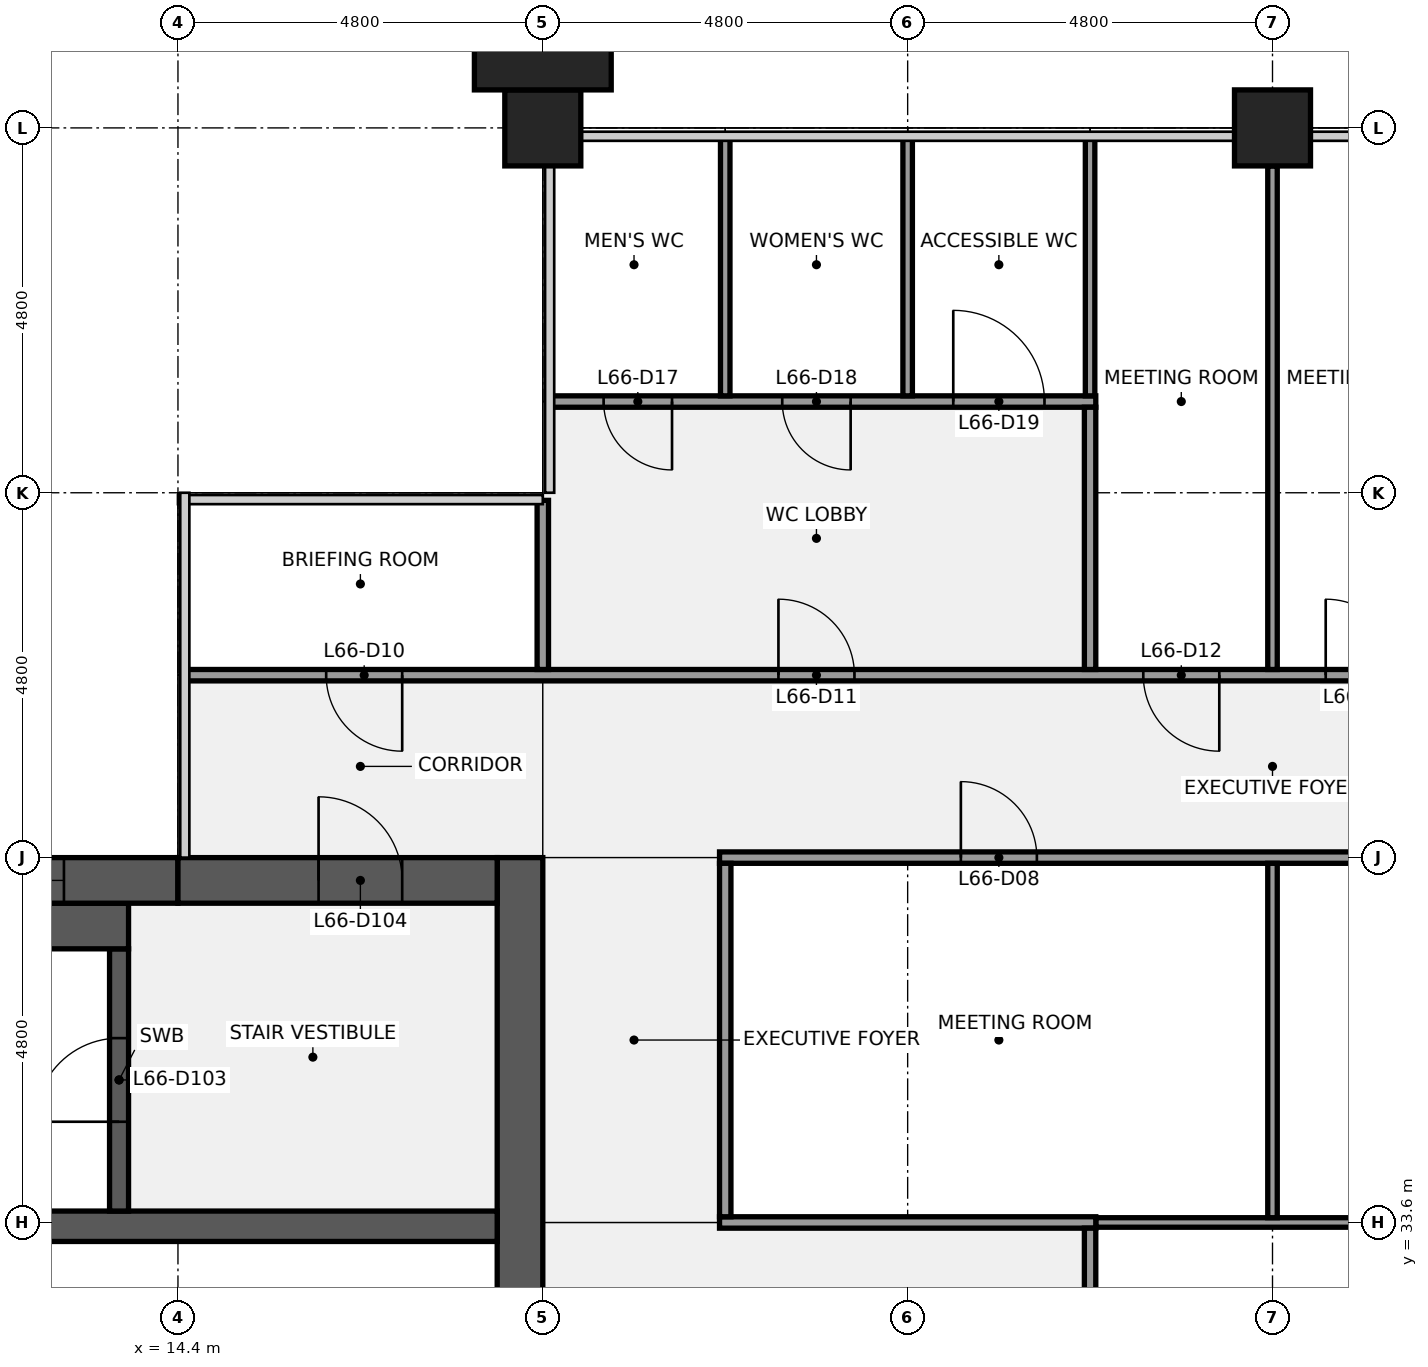
"""IFC4 building model, lengths in metres.
Left out: names, types, materials, properties, quantities, classifications, styles, units other than length and angle.
Written with IfcOpenShell. Run it as: python <this file> out.ifc"""

import sys

from ifc_helpers import new_model, si_unit, direction, frame, frame_2d, origin, origin_2d, place, context, subcontext, project, spatial, rectangle, extrude, element, fill, save


model = new_model("IFC4")
c1 = context("Model", 3, precision=1e-05, world=origin(), true_north=direction((0.0, 1.0)))
c2 = subcontext(c1, "Body", "Model", "MODEL_VIEW")
j1 = project(units=[si_unit("LENGTHUNIT", "METRE"), si_unit("PLANEANGLEUNIT", "RADIAN")], contexts=[c1])
p1 = place(None, origin())
s1 = spatial("IfcSite", under=j1, at=p1, CompositionType="ELEMENT")
p2 = place(p1, origin())
s2 = spatial("IfcBuilding", under=s1, at=p2, CompositionType="ELEMENT")
p3 = place(p2, frame((0.0, 0.0, 302.3)))
s3 = spatial("IfcBuildingStorey", under=s2, at=p3, CompositionType="ELEMENT", Elevation=302.3)
for number, where, z_axis, x_axis in (
    (1, (19.2, 48.0, 0.0), (0.0, 0.0, 1.0), (1.0, 0.0, 0.0)),
    (2, (28.8, 48.0, 0.0), (0.0, 0.0, 1.0), (1.0, 0.0, 0.0)),
):
    element("IfcColumn", number, at=place(p3, frame(where, z_axis=z_axis, x_axis=x_axis)), inside=s3, PredefinedType="COLUMN", context=c2, shape_type="SweptSolid", body=[
        extrude(rectangle(XDim=1.0, YDim=1.0, at=origin_2d()), origin(), (0.0, 0.0, 1.0), 4.0),
    ])
p4 = place(p3, frame((18.9, 38.4, 0.0), z_axis=(0.0, 0.0, 1.0), x_axis=(0.0, -1.0, 0.0)))
e3 = element("IfcWall", 3, at=p4, inside=s3, PredefinedType="SHEAR", context=c2, shape_type="SweptSolid", body=[
    extrude(rectangle(XDim=28.8, YDim=0.6, at=frame_2d((14.4, 0.0))), origin(), (0.0, 0.0, 1.0), 3.84),
])
p5 = place(p4, frame((18.3, 0.0, 0.0)))
e4 = element("IfcOpeningElement", 4, at=p5, cuts=e3, PredefinedType="OPENING", context=c2, shape_type="SweptSolid", body=[
    extrude(rectangle(XDim=1.8, YDim=2.1, at=frame_2d((0.9, 1.05))), frame((0.0, 0.31, 0.0), z_axis=(0.0, -1.0, 0.0), x_axis=(1.0, 0.0, 0.0)), (0.0, 0.0, 1.0), 0.62),
])
p6 = place(p4, frame((8.7, 0.0, 0.0)))
e5 = element("IfcOpeningElement", 5, at=p6, cuts=e3, PredefinedType="OPENING", context=c2, shape_type="SweptSolid", body=[
    extrude(rectangle(XDim=1.8, YDim=2.1, at=frame_2d((0.9, 1.05))), frame((0.0, 0.31, 0.0), z_axis=(0.0, -1.0, 0.0), x_axis=(1.0, 0.0, 0.0)), (0.0, 0.0, 1.0), 0.62),
])
p7 = place(p3, frame((0.6, 33.55, 0.0), z_axis=(0.0, 0.0, 1.0), x_axis=(1.0, 0.0, 0.0)))
e6 = element("IfcWall", 6, at=p7, inside=s3, PredefinedType="SHEAR", context=c2, shape_type="SweptSolid", body=[
    extrude(rectangle(XDim=18.0, YDim=0.4, at=frame_2d((9.0, 0.0))), origin(), (0.0, 0.0, 1.0), 3.84),
])
p8 = place(p3, frame((13.625, 33.75, 0.0), z_axis=(0.0, 0.0, 1.0), x_axis=(0.0, 1.0, 0.0)))
e7 = element("IfcWall", 7, at=p8, inside=s3, PredefinedType="SHEAR", context=c2, shape_type="SweptSolid", body=[
    extrude(rectangle(XDim=3.45, YDim=0.25, at=frame_2d((1.725, 0.0))), origin(), (0.0, 0.0, 1.0), 3.84),
])
p9 = place(p8, frame((1.175, 0.0, 0.0)))
e8 = element("IfcOpeningElement", 8, at=p9, cuts=e7, PredefinedType="OPENING", context=c2, shape_type="SweptSolid", body=[
    extrude(rectangle(XDim=1.1, YDim=2.1, at=frame_2d((0.55, 1.05))), frame((0.0, 0.135, 0.0), z_axis=(0.0, -1.0, 0.0), x_axis=(1.0, 0.0, 0.0)), (0.0, 0.0, 1.0), 0.27),
])
p10 = place(p3, frame((6.25, 37.5, 0.0), z_axis=(0.0, 0.0, 1.0), x_axis=(1.0, 0.0, 0.0)))
e9 = element("IfcWall", 9, at=p10, inside=s3, PredefinedType="SHEAR", context=c2, shape_type="SweptSolid", body=[
    extrude(rectangle(XDim=7.5, YDim=0.6, at=frame_2d((3.75, 0.0))), origin(), (0.0, 0.0, 1.0), 3.84),
])
p11 = place(p3, frame((0.6, 38.1, 0.0), z_axis=(0.0, 0.0, 1.0), x_axis=(1.0, 0.0, 0.0)))
e10 = element("IfcWall", 10, at=p11, inside=s3, PredefinedType="SHEAR", context=c2, shape_type="SweptSolid", body=[
    extrude(rectangle(XDim=13.8, YDim=0.6, at=frame_2d((6.9, 0.0))), origin(), (0.0, 0.0, 1.0), 3.84),
])
p12 = place(p11, frame((5.7, 0.0, 0.9)))
e11 = element("IfcOpeningElement", 11, at=p12, cuts=e10, PredefinedType="OPENING", context=c2, shape_type="SweptSolid", body=[
    extrude(rectangle(XDim=1.8, YDim=1.5, at=frame_2d((0.9, 0.75))), frame((0.0, 0.31, 0.0), z_axis=(0.0, -1.0, 0.0), x_axis=(1.0, 0.0, 0.0)), (0.0, 0.0, 1.0), 0.62),
])
p13 = place(p11, frame((10.5, 0.0, 0.9)))
e12 = element("IfcOpeningElement", 12, at=p13, cuts=e10, PredefinedType="OPENING", context=c2, shape_type="SweptSolid", body=[
    extrude(rectangle(XDim=1.8, YDim=1.5, at=frame_2d((0.9, 0.75))), frame((0.0, 0.31, 0.0), z_axis=(0.0, -1.0, 0.0), x_axis=(1.0, 0.0, 0.0)), (0.0, 0.0, 1.0), 0.62),
])
p14 = place(p3, frame((14.4, 38.1, 0.0), z_axis=(0.0, 0.0, 1.0), x_axis=(1.0, 0.0, 0.0)))
e13 = element("IfcWall", 13, at=p14, inside=s3, PredefinedType="SHEAR", context=c2, shape_type="SweptSolid", body=[
    extrude(rectangle(XDim=4.2, YDim=0.6, at=frame_2d((2.1, 0.0))), origin(), (0.0, 0.0, 1.0), 3.84),
])
p15 = place(p14, frame((1.85, 0.0, 0.0)))
e14 = element("IfcOpeningElement", 14, at=p15, cuts=e13, PredefinedType="OPENING", context=c2, shape_type="SweptSolid", body=[
    extrude(rectangle(XDim=1.1, YDim=2.1, at=frame_2d((0.55, 1.05))), frame((0.0, 0.31, 0.0), z_axis=(0.0, -1.0, 0.0), x_axis=(1.0, 0.0, 0.0)), (0.0, 0.0, 1.0), 0.62),
])
p16 = place(p3, frame((26.475, 33.6, 0.0), z_axis=(0.0, 0.0, 1.0), x_axis=(1.0, 0.0, 0.0)))
e15 = element("IfcWall", 15, at=p16, inside=s3, PredefinedType="PARTITIONING", context=c2, shape_type="SweptSolid", body=[
    extrude(rectangle(XDim=4.8, YDim=0.125, at=frame_2d((2.4, 0.0))), origin(), (0.0, 0.0, 1.0), 2.87),
])
p17 = place(p3, frame((21.525, 33.6, 0.0), z_axis=(0.0, 0.0, 1.0), x_axis=(1.0, 0.0, 0.0)))
e16 = element("IfcWall", 16, at=p17, inside=s3, PredefinedType="PARTITIONING", context=c2, shape_type="SweptSolid", body=[
    extrude(rectangle(XDim=4.95, YDim=0.15, at=frame_2d((2.475, 0.0))), origin(), (0.0, 0.0, 1.0), 2.87),
])
p18 = place(p3, frame((21.525, 38.4, 0.0), z_axis=(0.0, 0.0, 1.0), x_axis=(1.0, 0.0, 0.0)))
e17 = element("IfcWall", 17, at=p18, inside=s3, PredefinedType="PARTITIONING", context=c2, shape_type="SweptSolid", body=[
    extrude(rectangle(XDim=14.55, YDim=0.15, at=frame_2d((7.275, 0.0))), origin(), (0.0, 0.0, 1.0), 2.87),
])
p19 = place(p18, frame((3.175, 0.0, 0.0)))
e18 = element("IfcOpeningElement", 18, at=p19, cuts=e17, PredefinedType="OPENING", context=c2, shape_type="SweptSolid", body=[
    extrude(rectangle(XDim=1.0, YDim=2.1, at=frame_2d((0.5, 1.05))), frame((0.0, 0.085, 0.0), z_axis=(0.0, -1.0, 0.0), x_axis=(1.0, 0.0, 0.0)), (0.0, 0.0, 1.0), 0.17),
])
p20 = place(p18, frame((10.375, 0.0, 0.0)))
e19 = element("IfcOpeningElement", 19, at=p20, cuts=e17, PredefinedType="OPENING", context=c2, shape_type="SweptSolid", body=[
    extrude(rectangle(XDim=1.0, YDim=2.1, at=frame_2d((0.5, 1.05))), frame((0.0, 0.085, 0.0), z_axis=(0.0, -1.0, 0.0), x_axis=(1.0, 0.0, 0.0)), (0.0, 0.0, 1.0), 0.17),
])
p21 = place(p3, frame((14.5, 40.8, 0.0), z_axis=(0.0, 0.0, 1.0), x_axis=(1.0, 0.0, 0.0)))
e20 = element("IfcWall", 20, at=p21, inside=s3, PredefinedType="PARTITIONING", context=c2, shape_type="SweptSolid", body=[
    extrude(rectangle(XDim=28.6, YDim=0.15, at=frame_2d((14.3, 0.0))), origin(), (0.0, 0.0, 1.0), 2.87),
])
p22 = place(p21, frame((1.85, 0.0, 0.0)))
e21 = element("IfcOpeningElement", 21, at=p22, cuts=e20, PredefinedType="OPENING", context=c2, shape_type="SweptSolid", body=[
    extrude(rectangle(XDim=1.0, YDim=2.1, at=frame_2d((0.5, 1.05))), frame((0.0, 0.085, 0.0), z_axis=(0.0, -1.0, 0.0), x_axis=(1.0, 0.0, 0.0)), (0.0, 0.0, 1.0), 0.17),
])
p23 = place(p21, frame((7.8, 0.0, 0.0)))
e22 = element("IfcOpeningElement", 22, at=p23, cuts=e20, PredefinedType="OPENING", context=c2, shape_type="SweptSolid", body=[
    extrude(rectangle(XDim=1.0, YDim=2.1, at=frame_2d((0.5, 1.05))), frame((0.0, 0.085, 0.0), z_axis=(0.0, -1.0, 0.0), x_axis=(1.0, 0.0, 0.0)), (0.0, 0.0, 1.0), 0.17),
])
p24 = place(p21, frame((12.6, 0.0, 0.0)))
e23 = element("IfcOpeningElement", 23, at=p24, cuts=e20, PredefinedType="OPENING", context=c2, shape_type="SweptSolid", body=[
    extrude(rectangle(XDim=1.0, YDim=2.1, at=frame_2d((0.5, 1.05))), frame((0.0, 0.085, 0.0), z_axis=(0.0, -1.0, 0.0), x_axis=(1.0, 0.0, 0.0)), (0.0, 0.0, 1.0), 0.17),
])
p25 = place(p21, frame((15.0, 0.0, 0.0)))
e24 = element("IfcOpeningElement", 24, at=p25, cuts=e20, PredefinedType="OPENING", context=c2, shape_type="SweptSolid", body=[
    extrude(rectangle(XDim=1.0, YDim=2.1, at=frame_2d((0.5, 1.05))), frame((0.0, 0.085, 0.0), z_axis=(0.0, -1.0, 0.0), x_axis=(1.0, 0.0, 0.0)), (0.0, 0.0, 1.0), 0.17),
])
p26 = place(p21, frame((18.6, 0.0, 0.0)))
e25 = element("IfcOpeningElement", 25, at=p26, cuts=e20, PredefinedType="OPENING", context=c2, shape_type="SweptSolid", body=[
    extrude(rectangle(XDim=1.0, YDim=2.1, at=frame_2d((0.5, 1.05))), frame((0.0, 0.085, 0.0), z_axis=(0.0, -1.0, 0.0), x_axis=(1.0, 0.0, 0.0)), (0.0, 0.0, 1.0), 0.17),
])
p27 = place(p21, frame((22.2, 0.0, 0.0)))
e26 = element("IfcOpeningElement", 26, at=p27, cuts=e20, PredefinedType="OPENING", context=c2, shape_type="SweptSolid", body=[
    extrude(rectangle(XDim=1.0, YDim=2.1, at=frame_2d((0.5, 1.05))), frame((0.0, 0.085, 0.0), z_axis=(0.0, -1.0, 0.0), x_axis=(1.0, 0.0, 0.0)), (0.0, 0.0, 1.0), 0.17),
])
p28 = place(p21, frame((25.75, 0.0, 0.0)))
e27 = element("IfcOpeningElement", 27, at=p28, cuts=e20, PredefinedType="OPENING", context=c2, shape_type="SweptSolid", body=[
    extrude(rectangle(XDim=1.0, YDim=2.1, at=frame_2d((0.5, 1.05))), frame((0.0, 0.085, 0.0), z_axis=(0.0, -1.0, 0.0), x_axis=(1.0, 0.0, 0.0)), (0.0, 0.0, 1.0), 0.17),
])
p29 = place(p3, frame((19.3, 44.4, 0.0), z_axis=(0.0, 0.0, 1.0), x_axis=(1.0, 0.0, 0.0)))
e28 = element("IfcWall", 28, at=p29, inside=s3, PredefinedType="PARTITIONING", context=c2, shape_type="SweptSolid", body=[
    extrude(rectangle(XDim=7.175, YDim=0.15, at=frame_2d((3.587, 0.0))), origin(), (0.0, 0.0, 1.0), 2.87),
])
p30 = place(p29, frame((0.7, 0.0, 0.0)))
e29 = element("IfcOpeningElement", 29, at=p30, cuts=e28, PredefinedType="OPENING", context=c2, shape_type="SweptSolid", body=[
    extrude(rectangle(XDim=0.9, YDim=2.1, at=frame_2d((0.45, 1.05))), frame((0.0, 0.085, 0.0), z_axis=(0.0, -1.0, 0.0), x_axis=(1.0, 0.0, 0.0)), (0.0, 0.0, 1.0), 0.17),
])
p31 = place(p29, frame((3.05, 0.0, 0.0)))
e30 = element("IfcOpeningElement", 30, at=p31, cuts=e28, PredefinedType="OPENING", context=c2, shape_type="SweptSolid", body=[
    extrude(rectangle(XDim=0.9, YDim=2.1, at=frame_2d((0.45, 1.05))), frame((0.0, 0.085, 0.0), z_axis=(0.0, -1.0, 0.0), x_axis=(1.0, 0.0, 0.0)), (0.0, 0.0, 1.0), 0.17),
])
p32 = place(p29, frame((5.3, 0.0, 0.0)))
e31 = element("IfcOpeningElement", 31, at=p32, cuts=e28, PredefinedType="OPENING", context=c2, shape_type="SweptSolid", body=[
    extrude(rectangle(XDim=1.2, YDim=2.1, at=frame_2d((0.6, 1.05))), frame((0.0, 0.085, 0.0), z_axis=(0.0, -1.0, 0.0), x_axis=(1.0, 0.0, 0.0)), (0.0, 0.0, 1.0), 0.17),
])
p33 = place(p3, frame((19.2, 40.875, 0.0), z_axis=(0.0, 0.0, 1.0), x_axis=(0.0, 1.0, 0.0)))
e32 = element("IfcWall", 32, at=p33, inside=s3, PredefinedType="PARTITIONING", context=c2, shape_type="SweptSolid", body=[
    extrude(rectangle(XDim=2.225, YDim=0.15, at=frame_2d((1.113, 0.0))), origin(), (0.0, 0.0, 1.0), 2.87),
])
p34 = place(p3, frame((21.6, 44.475, 0.0), z_axis=(0.0, 0.0, 1.0), x_axis=(0.0, 1.0, 0.0)))
e33 = element("IfcWall", 33, at=p34, inside=s3, PredefinedType="PARTITIONING", context=c2, shape_type="SweptSolid", body=[
    extrude(rectangle(XDim=3.425, YDim=0.125, at=frame_2d((1.712, 0.0))), origin(), (0.0, 0.0, 1.0), 2.87),
])
p35 = place(p3, frame((21.6, 33.675, 0.0), z_axis=(0.0, 0.0, 1.0), x_axis=(0.0, 1.0, 0.0)))
e34 = element("IfcWall", 34, at=p35, inside=s3, PredefinedType="PARTITIONING", context=c2, shape_type="SweptSolid", body=[
    extrude(rectangle(XDim=4.65, YDim=0.15, at=frame_2d((2.325, 0.0))), origin(), (0.0, 0.0, 1.0), 2.87),
])
for number, where, z_axis, x_axis in (
    (35, (24.0, 44.475, 0.0), (0.0, 0.0, 1.0), (0.0, 1.0, 0.0)),
    (36, (26.4, 44.475, 0.0), (0.0, 0.0, 1.0), (0.0, 1.0, 0.0)),
):
    element("IfcWall", number, at=place(p3, frame(where, z_axis=z_axis, x_axis=x_axis)), inside=s3, PredefinedType="PARTITIONING", context=c2, shape_type="SweptSolid", body=[
        extrude(rectangle(XDim=3.425, YDim=0.125, at=frame_2d((1.712, 0.0))), origin(), (0.0, 0.0, 1.0), 2.87),
    ])
p36 = place(p3, frame((26.4, 26.475, 0.0), z_axis=(0.0, 0.0, 1.0), x_axis=(0.0, 1.0, 0.0)))
e37 = element("IfcWall", 37, at=p36, inside=s3, PredefinedType="PARTITIONING", context=c2, shape_type="SweptSolid", body=[
    extrude(rectangle(XDim=7.05, YDim=0.15, at=frame_2d((3.525, 0.0))), origin(), (0.0, 0.0, 1.0), 2.87),
])
p37 = place(p36, frame((3.025, 0.0, 0.0)))
e38 = element("IfcOpeningElement", 38, at=p37, cuts=e37, PredefinedType="OPENING", context=c2, shape_type="SweptSolid", body=[
    extrude(rectangle(XDim=1.0, YDim=2.1, at=frame_2d((0.5, 1.05))), frame((0.0, 0.085, 0.0), z_axis=(0.0, -1.0, 0.0), x_axis=(1.0, 0.0, 0.0)), (0.0, 0.0, 1.0), 0.17),
])
p38 = place(p3, frame((26.4, 40.875, 0.0), z_axis=(0.0, 0.0, 1.0), x_axis=(0.0, 1.0, 0.0)))
e39 = element("IfcWall", 39, at=p38, inside=s3, PredefinedType="PARTITIONING", context=c2, shape_type="SweptSolid", body=[
    extrude(rectangle(XDim=3.45, YDim=0.15, at=frame_2d((1.725, 0.0))), origin(), (0.0, 0.0, 1.0), 2.87),
])
p39 = place(p3, frame((28.8, 33.663, 0.0), z_axis=(0.0, 0.0, 1.0), x_axis=(0.0, 1.0, 0.0)))
e40 = element("IfcWall", 40, at=p39, inside=s3, PredefinedType="PARTITIONING", context=c2, shape_type="SweptSolid", body=[
    extrude(rectangle(XDim=4.662, YDim=0.125, at=frame_2d((2.331, 0.0))), origin(), (0.0, 0.0, 1.0), 2.87),
])
p40 = place(p3, frame((28.8, 40.875, 0.0), z_axis=(0.0, 0.0, 1.0), x_axis=(0.0, 1.0, 0.0)))
e41 = element("IfcWall", 41, at=p40, inside=s3, PredefinedType="PARTITIONING", context=c2, shape_type="SweptSolid", body=[
    extrude(rectangle(XDim=6.625, YDim=0.125, at=frame_2d((3.312, 0.0))), origin(), (0.0, 0.0, 1.0), 2.87),
])
p41 = place(p3, frame((19.2, 49.0, 0.0), z_axis=(0.0, 0.0, 1.0), x_axis=(1.0, 0.0, 0.0)))
e42 = element("IfcColumn", 42, at=p41, inside=s3, PredefinedType="PILASTER", context=c2, shape_type="SweptSolid", body=[
    extrude(rectangle(XDim=1.8, YDim=1.0, at=origin_2d()), origin(), (0.0, 0.0, 1.0), 4.0),
])
p42 = place(p9, origin())
e43 = element("IfcDoor", 43, at=p42, inside=s3, OperationType="SINGLE_SWING_LEFT", PredefinedType="DOOR", context=c2, shape_type="SweptSolid", body=[
    extrude(rectangle(XDim=1.1, YDim=2.1, at=frame_2d((0.55, 1.05))), frame((0.0, 0.025, 0.0), z_axis=(0.0, -1.0, 0.0), x_axis=(1.0, 0.0, 0.0)), (0.0, 0.0, 1.0), 0.05),
])
fill(e8, e43)
p43 = place(p15, origin())
e44 = element("IfcDoor", 44, at=p43, inside=s3, OperationType="SINGLE_SWING_LEFT", PredefinedType="DOOR", context=c2, shape_type="SweptSolid", body=[
    extrude(rectangle(XDim=1.1, YDim=2.1, at=frame_2d((0.55, 1.05))), frame((0.0, 0.025, 0.0), z_axis=(0.0, -1.0, 0.0), x_axis=(1.0, 0.0, 0.0)), (0.0, 0.0, 1.0), 0.05),
])
fill(e14, e44)
p44 = place(p13, origin())
e45 = element("IfcWindow", 45, at=p44, inside=s3, PartitioningType="SINGLE_PANEL", PredefinedType="WINDOW", context=c2, shape_type="SweptSolid", body=[
    extrude(rectangle(XDim=1.8, YDim=1.5, at=frame_2d((0.9, 0.75))), frame((0.0, 0.03, 0.0), z_axis=(0.0, -1.0, 0.0), x_axis=(1.0, 0.0, 0.0)), (0.0, 0.0, 1.0), 0.06),
])
fill(e12, e45)
p45 = place(p19, origin())
e46 = element("IfcDoor", 46, at=p45, inside=s3, OperationType="SINGLE_SWING_LEFT", PredefinedType="DOOR", context=c2, shape_type="SweptSolid", body=[
    extrude(rectangle(XDim=1.0, YDim=2.1, at=frame_2d((0.5, 1.05))), frame((0.0, 0.025, 0.0), z_axis=(0.0, -1.0, 0.0), x_axis=(1.0, 0.0, 0.0)), (0.0, 0.0, 1.0), 0.05),
])
fill(e18, e46)
p46 = place(p22, origin())
e47 = element("IfcDoor", 47, at=p46, inside=s3, OperationType="SINGLE_SWING_RIGHT", PredefinedType="DOOR", context=c2, shape_type="SweptSolid", body=[
    extrude(rectangle(XDim=1.0, YDim=2.1, at=frame_2d((0.5, 1.05))), frame((0.0, 0.025, 0.0), z_axis=(0.0, -1.0, 0.0), x_axis=(1.0, 0.0, 0.0)), (0.0, 0.0, 1.0), 0.05),
])
fill(e21, e47)
p47 = place(p23, origin())
e48 = element("IfcDoor", 48, at=p47, inside=s3, OperationType="SINGLE_SWING_LEFT", PredefinedType="DOOR", context=c2, shape_type="SweptSolid", body=[
    extrude(rectangle(XDim=1.0, YDim=2.1, at=frame_2d((0.5, 1.05))), frame((0.0, 0.025, 0.0), z_axis=(0.0, -1.0, 0.0), x_axis=(1.0, 0.0, 0.0)), (0.0, 0.0, 1.0), 0.05),
])
fill(e22, e48)
p48 = place(p24, origin())
e49 = element("IfcDoor", 49, at=p48, inside=s3, OperationType="SINGLE_SWING_RIGHT", PredefinedType="DOOR", context=c2, shape_type="SweptSolid", body=[
    extrude(rectangle(XDim=1.0, YDim=2.1, at=frame_2d((0.5, 1.05))), frame((0.0, 0.025, 0.0), z_axis=(0.0, -1.0, 0.0), x_axis=(1.0, 0.0, 0.0)), (0.0, 0.0, 1.0), 0.05),
])
fill(e23, e49)
p49 = place(p25, origin())
e50 = element("IfcDoor", 50, at=p49, inside=s3, OperationType="SINGLE_SWING_LEFT", PredefinedType="DOOR", context=c2, shape_type="SweptSolid", body=[
    extrude(rectangle(XDim=1.0, YDim=2.1, at=frame_2d((0.5, 1.05))), frame((0.0, 0.025, 0.0), z_axis=(0.0, -1.0, 0.0), x_axis=(1.0, 0.0, 0.0)), (0.0, 0.0, 1.0), 0.05),
])
fill(e24, e50)
p50 = place(p30, origin())
e51 = element("IfcDoor", 51, at=p50, inside=s3, OperationType="SINGLE_SWING_RIGHT", PredefinedType="DOOR", context=c2, shape_type="SweptSolid", body=[
    extrude(rectangle(XDim=0.9, YDim=2.1, at=frame_2d((0.45, 1.05))), frame((0.0, 0.025, 0.0), z_axis=(0.0, -1.0, 0.0), x_axis=(1.0, 0.0, 0.0)), (0.0, 0.0, 1.0), 0.05),
])
fill(e29, e51)
p51 = place(p31, origin())
e52 = element("IfcDoor", 52, at=p51, inside=s3, OperationType="SINGLE_SWING_RIGHT", PredefinedType="DOOR", context=c2, shape_type="SweptSolid", body=[
    extrude(rectangle(XDim=0.9, YDim=2.1, at=frame_2d((0.45, 1.05))), frame((0.0, 0.025, 0.0), z_axis=(0.0, -1.0, 0.0), x_axis=(1.0, 0.0, 0.0)), (0.0, 0.0, 1.0), 0.05),
])
fill(e30, e52)
p52 = place(p32, origin())
e53 = element("IfcDoor", 53, at=p52, inside=s3, OperationType="SINGLE_SWING_LEFT", PredefinedType="DOOR", context=c2, shape_type="SweptSolid", body=[
    extrude(rectangle(XDim=1.2, YDim=2.1, at=frame_2d((0.6, 1.05))), frame((0.0, 0.025, 0.0), z_axis=(0.0, -1.0, 0.0), x_axis=(1.0, 0.0, 0.0)), (0.0, 0.0, 1.0), 0.05),
])
fill(e31, e53)
save(model, sys.argv[1])
